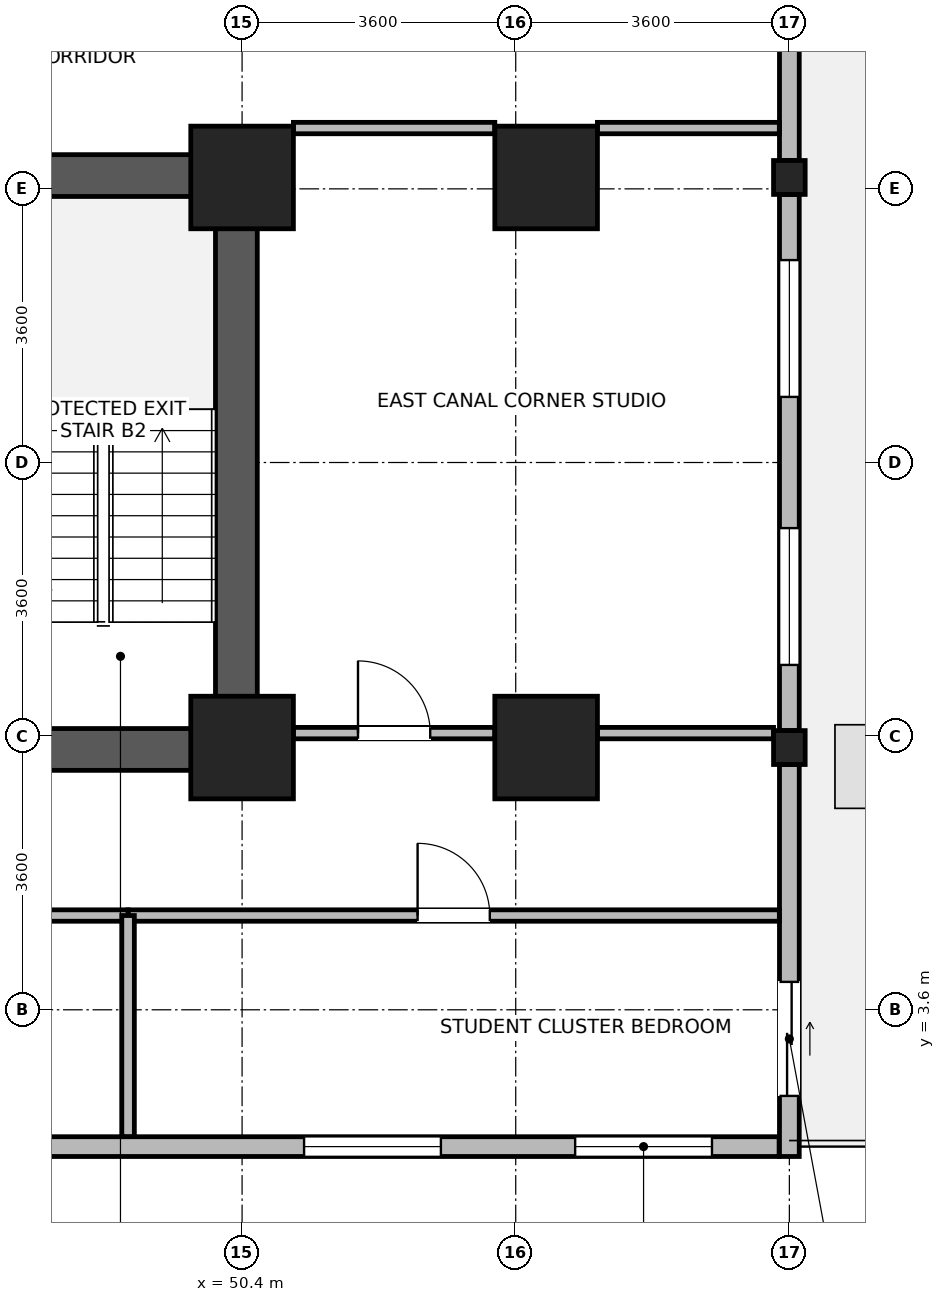
"""IFC4 building model, lengths in metres.
Left out: names, types, materials, properties, quantities, classifications, styles, units other than length and angle.
Written with IfcOpenShell. Run it as: python <this file> out.ifc"""

import sys

from ifc_helpers import new_model, si_unit, direction, frame, frame_2d, origin, origin_2d, place, context, subcontext, project, spatial, rectangle, i_section, extrude, source, transform, mapped, element, fill, save


model = new_model("IFC4")
c1 = context("Model", 3, precision=1e-05, world=origin(), true_north=direction((0.0, 1.0)))
c2 = subcontext(c1, "Body", "Model", "MODEL_VIEW")
j1 = project(units=[si_unit("LENGTHUNIT", "METRE"), si_unit("PLANEANGLEUNIT", "RADIAN")], contexts=[c1])
p1 = place(None, origin())
s1 = spatial("IfcSite", under=j1, at=p1, CompositionType="ELEMENT")
p2 = place(p1, origin())
s2 = spatial("IfcBuilding", under=s1, at=p2, CompositionType="ELEMENT")
p3 = place(p2, frame((0.0, 0.0, 32.7)))
s3 = spatial("IfcBuildingStorey", under=s2, at=p3, CompositionType="ELEMENT", Elevation=32.7)
p4 = place(p3, frame((50.325, 6.75, 0.0), z_axis=(0.0, 0.0, 1.0), x_axis=(0.0, 1.0, 0.0)))
e1 = element("IfcWall", 1, at=p4, inside=s3, PredefinedType="SHEAR", context=c2, shape_type="SweptSolid", body=[
    extrude(rectangle(XDim=8.1, YDim=0.55, at=frame_2d((4.05, 0.0))), origin(), (0.0, 0.0, 1.0), 3.45),
])
for number, where, z_axis, x_axis in (
    (2, (46.85, 7.025, 0.0), (0.0, 0.0, 1.0), (1.0, 0.0, 0.0)),
    (3, (46.85, 14.575, 0.0), (0.0, 0.0, 1.0), (1.0, 0.0, 0.0)),
):
    element("IfcWall", number, at=place(p3, frame(where, z_axis=z_axis, x_axis=x_axis)), inside=s3, PredefinedType="SHEAR", context=c2, shape_type="SweptSolid", body=[
        extrude(rectangle(XDim=3.2, YDim=0.55, at=frame_2d((1.6, 0.0))), origin(), (0.0, 0.0, 1.0), 3.45),
    ])
m1 = source(origin(), c2, "Body", "SweptSolid", [
    extrude(rectangle(XDim=1.35, YDim=1.35, at=origin_2d()), origin(), (0.0, 0.0, 1.0), 3.7),
])
for number, where, z_axis, x_axis in (
    (4, (50.4, 7.05, 0.0), (0.0, 0.0, 1.0), (1.0, 0.0, 0.0)),
    (5, (50.4, 14.55, 0.0), (0.0, 0.0, 1.0), (1.0, 0.0, 0.0)),
    (6, (54.4, 7.05, 0.0), (0.0, 0.0, 1.0), (1.0, 0.0, 0.0)),
    (7, (54.4, 14.55, 0.0), (0.0, 0.0, 1.0), (1.0, 0.0, 0.0)),
):
    element("IfcColumn", number, at=place(p3, frame(where, z_axis=z_axis, x_axis=x_axis)), inside=s3, PredefinedType="COLUMN", context=c2, shape_type="MappedRepresentation", body=[
        mapped(m1, transform((0.0, 0.0, 0.0), x_axis=(1.0, 0.0, 0.0), y_axis=(0.0, 1.0, 0.0), z_axis=(0.0, 0.0, 1.0), scale=1.0)),
    ])
m2 = source(origin(), c2, "Body", "SweptSolid", [
    extrude(i_section(OverallWidth=0.416, OverallDepth=0.446, WebThickness=0.029, FlangeThickness=0.04, FilletRadius=0.015, at=origin_2d()), origin(), (0.0, 0.0, 1.0), 3.7),
])
for number, where, z_axis, x_axis in (
    (8, (57.6, 7.05, 0.0), (0.0, 0.0, 1.0), (1.0, 0.0, 0.0)),
    (9, (57.6, 14.55, 0.0), (0.0, 0.0, 1.0), (1.0, 0.0, 0.0)),
):
    element("IfcColumn", number, at=place(p3, frame(where, z_axis=z_axis, x_axis=x_axis)), inside=s3, PredefinedType="COLUMN", context=c2, shape_type="MappedRepresentation", body=[
        mapped(m2, transform((0.0, 0.0, 0.0), x_axis=(1.0, 0.0, 0.0), y_axis=(0.0, 1.0, 0.0), z_axis=(0.0, 0.0, 1.0), scale=1.0)),
    ])
p5 = place(p3, frame((57.465, 1.8, 0.0), z_axis=(0.0, 0.0, 1.0), x_axis=(-1.0, 0.0, 0.0)))
e10 = element("IfcWall", 10, at=p5, inside=s3, PredefinedType="STANDARD", context=c2, shape_type="SweptSolid", body=[
    extrude(rectangle(XDim=28.53, YDim=0.26, at=frame_2d((14.265, 0.0))), origin(), (0.0, 0.0, 1.0), 3.43),
])
p6 = place(p5, frame((0.883, 0.0, 0.85)))
e11 = element("IfcOpeningElement", 11, at=p6, cuts=e10, PredefinedType="OPENING", context=c2, shape_type="SweptSolid", body=[
    extrude(rectangle(XDim=1.8, YDim=1.85, at=frame_2d((0.9, 0.925))), frame((0.0, 0.14, 0.0), z_axis=(0.0, -1.0, 0.0), x_axis=(1.0, 0.0, 0.0)), (0.0, 0.0, 1.0), 0.28),
])
p7 = place(p5, frame((4.449, 0.0, 0.85)))
e12 = element("IfcOpeningElement", 12, at=p7, cuts=e10, PredefinedType="OPENING", context=c2, shape_type="SweptSolid", body=[
    extrude(rectangle(XDim=1.8, YDim=1.85, at=frame_2d((0.9, 0.925))), frame((0.0, 0.14, 0.0), z_axis=(0.0, -1.0, 0.0), x_axis=(1.0, 0.0, 0.0)), (0.0, 0.0, 1.0), 0.28),
])
p8 = place(p5, frame((11.582, 0.0, 0.85)))
e13 = element("IfcOpeningElement", 13, at=p8, cuts=e10, PredefinedType="OPENING", context=c2, shape_type="SweptSolid", body=[
    extrude(rectangle(XDim=1.8, YDim=1.85, at=frame_2d((0.9, 0.925))), frame((0.0, 0.14, 0.0), z_axis=(0.0, -1.0, 0.0), x_axis=(1.0, 0.0, 0.0)), (0.0, 0.0, 1.0), 0.28),
])
p9 = place(p5, frame((18.714, 0.0, 0.85)))
e14 = element("IfcOpeningElement", 14, at=p9, cuts=e10, PredefinedType="OPENING", context=c2, shape_type="SweptSolid", body=[
    extrude(rectangle(XDim=1.8, YDim=1.85, at=frame_2d((0.9, 0.925))), frame((0.0, 0.14, 0.0), z_axis=(0.0, -1.0, 0.0), x_axis=(1.0, 0.0, 0.0)), (0.0, 0.0, 1.0), 0.28),
])
p10 = place(p5, frame((22.281, 0.0, 0.85)))
e15 = element("IfcOpeningElement", 15, at=p10, cuts=e10, PredefinedType="OPENING", context=c2, shape_type="SweptSolid", body=[
    extrude(rectangle(XDim=1.8, YDim=1.85, at=frame_2d((0.9, 0.925))), frame((0.0, 0.14, 0.0), z_axis=(0.0, -1.0, 0.0), x_axis=(1.0, 0.0, 0.0)), (0.0, 0.0, 1.0), 0.28),
])
p11 = place(p5, frame((25.847, 0.0, 0.85)))
e16 = element("IfcOpeningElement", 16, at=p11, cuts=e10, PredefinedType="OPENING", context=c2, shape_type="SweptSolid", body=[
    extrude(rectangle(XDim=1.8, YDim=1.85, at=frame_2d((0.9, 0.925))), frame((0.0, 0.14, 0.0), z_axis=(0.0, -1.0, 0.0), x_axis=(1.0, 0.0, 0.0)), (0.0, 0.0, 1.0), 0.28),
])
p12 = place(p3, frame((57.6, 6.826, 0.0), z_axis=(0.0, 0.0, 1.0), x_axis=(0.0, -1.0, 0.0)))
e17 = element("IfcWall", 17, at=p12, inside=s3, PredefinedType="STANDARD", context=c2, shape_type="SweptSolid", body=[
    extrude(rectangle(XDim=5.156, YDim=0.26, at=frame_2d((2.578, 0.0))), origin(), (0.0, 0.0, 1.0), 3.43),
])
p13 = place(p12, frame((2.859, 0.0, 0.0)))
e18 = element("IfcOpeningElement", 18, at=p13, cuts=e17, PredefinedType="OPENING", context=c2, shape_type="SweptSolid", body=[
    extrude(rectangle(XDim=1.5, YDim=2.15, at=frame_2d((0.75, 1.075))), frame((0.0, 0.14, 0.0), z_axis=(0.0, -1.0, 0.0), x_axis=(1.0, 0.0, 0.0)), (0.0, 0.0, 1.0), 0.28),
])
p14 = place(p3, frame((57.6, 14.326, 0.0), z_axis=(0.0, 0.0, 1.0), x_axis=(0.0, -1.0, 0.0)))
e19 = element("IfcWall", 19, at=p14, inside=s3, PredefinedType="STANDARD", context=c2, shape_type="SweptSolid", body=[
    extrude(rectangle(XDim=7.052, YDim=0.26, at=frame_2d((3.526, 0.0))), origin(), (0.0, 0.0, 1.0), 2.93),
])
p15 = place(p14, frame((0.863, 0.0, 0.85)))
e20 = element("IfcOpeningElement", 20, at=p15, cuts=e19, PredefinedType="OPENING", context=c2, shape_type="SweptSolid", body=[
    extrude(rectangle(XDim=1.8, YDim=1.85, at=frame_2d((0.9, 0.925))), frame((0.0, 0.14, 0.0), z_axis=(0.0, -1.0, 0.0), x_axis=(1.0, 0.0, 0.0)), (0.0, 0.0, 1.0), 0.28),
])
p16 = place(p14, frame((4.389, 0.0, 0.85)))
e21 = element("IfcOpeningElement", 21, at=p16, cuts=e19, PredefinedType="OPENING", context=c2, shape_type="SweptSolid", body=[
    extrude(rectangle(XDim=1.8, YDim=1.85, at=frame_2d((0.9, 0.925))), frame((0.0, 0.14, 0.0), z_axis=(0.0, -1.0, 0.0), x_axis=(1.0, 0.0, 0.0)), (0.0, 0.0, 1.0), 0.28),
])
p17 = place(p3, frame((57.6, 21.376, 0.0), z_axis=(0.0, 0.0, 1.0), x_axis=(0.0, -1.0, 0.0)))
e22 = element("IfcWall", 22, at=p17, inside=s3, PredefinedType="STANDARD", context=c2, shape_type="SweptSolid", body=[
    extrude(rectangle(XDim=6.602, YDim=0.26, at=frame_2d((3.301, 0.0))), origin(), (0.0, 0.0, 1.0), 2.93),
])
p18 = place(p17, frame((0.75, 0.0, 0.85)))
e23 = element("IfcOpeningElement", 23, at=p18, cuts=e22, PredefinedType="OPENING", context=c2, shape_type="SweptSolid", body=[
    extrude(rectangle(XDim=1.8, YDim=1.85, at=frame_2d((0.9, 0.925))), frame((0.0, 0.14, 0.0), z_axis=(0.0, -1.0, 0.0), x_axis=(1.0, 0.0, 0.0)), (0.0, 0.0, 1.0), 0.28),
])
p19 = place(p3, frame((48.9, 4.84, 0.0), z_axis=(0.0, 0.0, 1.0), x_axis=(1.0, 0.0, 0.0)))
e24 = element("IfcWall", 24, at=p19, inside=s3, PredefinedType="PARTITIONING", context=c2, shape_type="SweptSolid", body=[
    extrude(rectangle(XDim=8.568, YDim=0.15, at=frame_2d((4.284, 0.0))), origin(), (0.0, 0.0, 1.0), 3.43),
])
p20 = place(p19, frame((3.809, 0.0, 0.0)))
e25 = element("IfcOpeningElement", 25, at=p20, cuts=e24, PredefinedType="OPENING", context=c2, shape_type="SweptSolid", body=[
    extrude(rectangle(XDim=0.95, YDim=2.1, at=frame_2d((0.475, 1.05))), frame((0.0, 0.085, 0.0), z_axis=(0.0, -1.0, 0.0), x_axis=(1.0, 0.0, 0.0)), (0.0, 0.0, 1.0), 0.17),
])
p21 = place(p3, frame((40.78, 4.84, 0.0), z_axis=(0.0, 0.0, 1.0), x_axis=(1.0, 0.0, 0.0)))
e26 = element("IfcWall", 26, at=p21, inside=s3, PredefinedType="PARTITIONING", context=c2, shape_type="SweptSolid", body=[
    extrude(rectangle(XDim=8.12, YDim=0.15, at=frame_2d((4.06, 0.0))), origin(), (0.0, 0.0, 1.0), 3.43),
])
p22 = place(p21, frame((3.585, 0.0, 0.0)))
e27 = element("IfcOpeningElement", 27, at=p22, cuts=e26, PredefinedType="OPENING", context=c2, shape_type="SweptSolid", body=[
    extrude(rectangle(XDim=0.95, YDim=2.1, at=frame_2d((0.475, 1.05))), frame((0.0, 0.085, 0.0), z_axis=(0.0, -1.0, 0.0), x_axis=(1.0, 0.0, 0.0)), (0.0, 0.0, 1.0), 0.17),
])
p23 = place(p3, frame((51.075, 7.24, 0.0), z_axis=(0.0, 0.0, 1.0), x_axis=(1.0, 0.0, 0.0)))
e28 = element("IfcWall", 28, at=p23, inside=s3, PredefinedType="PARTITIONING", context=c2, shape_type="SweptSolid", body=[
    extrude(rectangle(XDim=2.65, YDim=0.15, at=frame_2d((1.325, 0.0))), origin(), (0.0, 0.0, 1.0), 2.78),
])
p24 = place(p23, frame((0.85, 0.0, 0.0)))
e29 = element("IfcOpeningElement", 29, at=p24, cuts=e28, PredefinedType="OPENING", context=c2, shape_type="SweptSolid", body=[
    extrude(rectangle(XDim=0.95, YDim=2.1, at=frame_2d((0.475, 1.05))), frame((0.0, 0.085, 0.0), z_axis=(0.0, -1.0, 0.0), x_axis=(1.0, 0.0, 0.0)), (0.0, 0.0, 1.0), 0.17),
])
p25 = place(p3, frame((55.075, 7.24, 0.0), z_axis=(0.0, 0.0, 1.0), x_axis=(1.0, 0.0, 0.0)))
e30 = element("IfcWall", 30, at=p25, inside=s3, PredefinedType="PARTITIONING", context=c2, shape_type="SweptSolid", body=[
    extrude(rectangle(XDim=2.317, YDim=0.15, at=frame_2d((1.159, 0.0))), origin(), (0.0, 0.0, 1.0), 2.78),
])
p26 = place(p3, frame((51.075, 15.2, 0.0), z_axis=(0.0, 0.0, 1.0), x_axis=(1.0, 0.0, 0.0)))
e31 = element("IfcWall", 31, at=p26, inside=s3, PredefinedType="PARTITIONING", context=c2, shape_type="SweptSolid", body=[
    extrude(rectangle(XDim=2.65, YDim=0.15, at=frame_2d((1.325, 0.0))), origin(), (0.0, 0.0, 1.0), 3.43),
])
p27 = place(p3, frame((55.075, 15.2, 0.0), z_axis=(0.0, 0.0, 1.0), x_axis=(1.0, 0.0, 0.0)))
e32 = element("IfcWall", 32, at=p27, inside=s3, PredefinedType="PARTITIONING", context=c2, shape_type="SweptSolid", body=[
    extrude(rectangle(XDim=2.393, YDim=0.15, at=frame_2d((1.197, 0.0))), origin(), (0.0, 0.0, 1.0), 3.43),
])
p28 = place(p3, frame((48.9, 1.932, 0.0), z_axis=(0.0, 0.0, 1.0), x_axis=(0.0, 1.0, 0.0)))
e33 = element("IfcWall", 33, at=p28, inside=s3, PredefinedType="PARTITIONING", context=c2, shape_type="SweptSolid", body=[
    extrude(rectangle(XDim=2.908, YDim=0.165, at=frame_2d((1.454, 0.0))), origin(), (0.0, 0.0, 1.0), 3.43),
])
p29 = place(p6, origin())
e34 = element("IfcWindow", 34, at=p29, inside=s3, PartitioningType="SINGLE_PANEL", PredefinedType="WINDOW", context=c2, shape_type="SweptSolid", body=[
    extrude(rectangle(XDim=1.8, YDim=1.85, at=frame_2d((0.9, 0.925))), frame((0.0, 0.03, 0.0), z_axis=(0.0, -1.0, 0.0), x_axis=(1.0, 0.0, 0.0)), (0.0, 0.0, 1.0), 0.06),
])
fill(e11, e34)
p30 = place(p7, origin())
e35 = element("IfcWindow", 35, at=p30, inside=s3, PartitioningType="SINGLE_PANEL", PredefinedType="WINDOW", context=c2, shape_type="SweptSolid", body=[
    extrude(rectangle(XDim=1.8, YDim=1.85, at=frame_2d((0.9, 0.925))), frame((0.0, 0.03, 0.0), z_axis=(0.0, -1.0, 0.0), x_axis=(1.0, 0.0, 0.0)), (0.0, 0.0, 1.0), 0.06),
])
fill(e12, e35)
p31 = place(p13, origin())
e36 = element("IfcDoor", 36, at=p31, inside=s3, OperationType="SLIDING_TO_LEFT", PredefinedType="DOOR", context=c2, shape_type="SweptSolid", body=[
    extrude(rectangle(XDim=1.5, YDim=2.15, at=frame_2d((0.75, 1.075))), frame((0.0, 0.025, 0.0), z_axis=(0.0, -1.0, 0.0), x_axis=(1.0, 0.0, 0.0)), (0.0, 0.0, 1.0), 0.05),
])
fill(e18, e36)
p32 = place(p15, origin())
e37 = element("IfcWindow", 37, at=p32, inside=s3, PartitioningType="SINGLE_PANEL", PredefinedType="WINDOW", context=c2, shape_type="SweptSolid", body=[
    extrude(rectangle(XDim=1.8, YDim=1.85, at=frame_2d((0.9, 0.925))), frame((0.0, 0.03, 0.0), z_axis=(0.0, -1.0, 0.0), x_axis=(1.0, 0.0, 0.0)), (0.0, 0.0, 1.0), 0.06),
])
fill(e20, e37)
p33 = place(p16, origin())
e38 = element("IfcWindow", 38, at=p33, inside=s3, PartitioningType="SINGLE_PANEL", PredefinedType="WINDOW", context=c2, shape_type="SweptSolid", body=[
    extrude(rectangle(XDim=1.8, YDim=1.85, at=frame_2d((0.9, 0.925))), frame((0.0, 0.03, 0.0), z_axis=(0.0, -1.0, 0.0), x_axis=(1.0, 0.0, 0.0)), (0.0, 0.0, 1.0), 0.06),
])
fill(e21, e38)
p34 = place(p20, origin())
e39 = element("IfcDoor", 39, at=p34, inside=s3, OperationType="SINGLE_SWING_LEFT", PredefinedType="DOOR", context=c2, shape_type="SweptSolid", body=[
    extrude(rectangle(XDim=0.95, YDim=2.1, at=frame_2d((0.475, 1.05))), frame((0.0, 0.025, 0.0), z_axis=(0.0, -1.0, 0.0), x_axis=(1.0, 0.0, 0.0)), (0.0, 0.0, 1.0), 0.05),
])
fill(e25, e39)
p35 = place(p24, origin())
e40 = element("IfcDoor", 40, at=p35, inside=s3, OperationType="SINGLE_SWING_LEFT", PredefinedType="DOOR", context=c2, shape_type="SweptSolid", body=[
    extrude(rectangle(XDim=0.95, YDim=2.1, at=frame_2d((0.475, 1.05))), frame((0.0, 0.025, 0.0), z_axis=(0.0, -1.0, 0.0), x_axis=(1.0, 0.0, 0.0)), (0.0, 0.0, 1.0), 0.05),
])
fill(e29, e40)
save(model, sys.argv[1])
